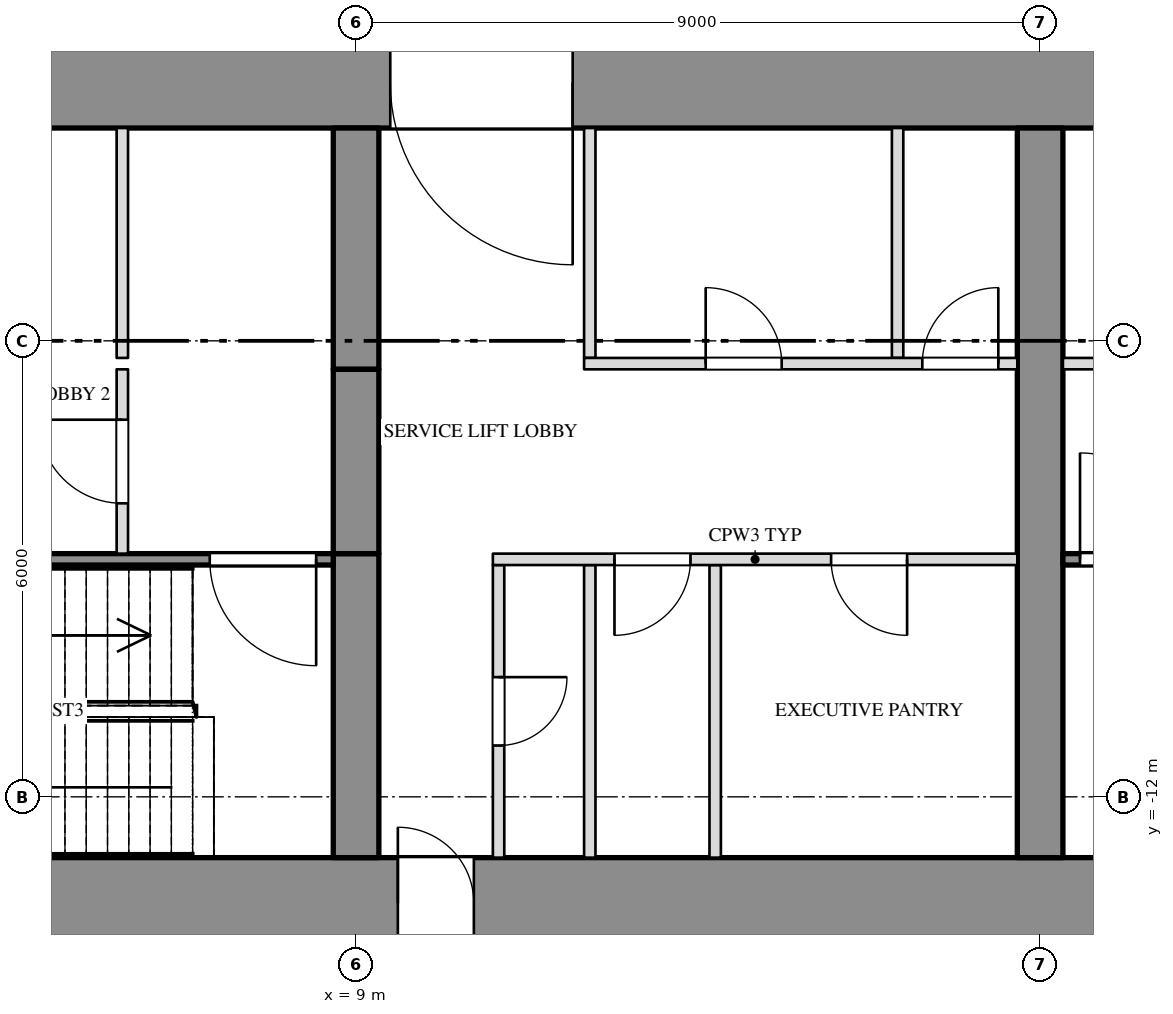
"""IFC4 building model, lengths in metres.
Left out: names, types, materials, properties, quantities, classifications, styles, units other than length and angle.
Written with IfcOpenShell. Run it as: python <this file> out.ifc"""

import sys

from ifc_helpers import new_model, si_unit, direction, frame, frame_2d, origin, place, context, subcontext, project, spatial, rectangle, extrude, element, fill, save


model = new_model("IFC4")
c1 = context("Model", 3, precision=1e-05, world=origin(), true_north=direction((0.0, 1.0)))
c2 = subcontext(c1, "Body", "Model", "MODEL_VIEW")
j1 = project(units=[si_unit("LENGTHUNIT", "METRE"), si_unit("PLANEANGLEUNIT", "RADIAN")], contexts=[c1])
p1 = place(None, origin())
s1 = spatial("IfcSite", under=j1, at=p1, CompositionType="ELEMENT")
p2 = place(p1, origin())
s2 = spatial("IfcBuilding", under=s1, at=p2, CompositionType="ELEMENT")
p3 = place(p2, frame((0.0, 0.0, 43.5)))
s3 = spatial("IfcBuildingStorey", under=s2, at=p3, CompositionType="ELEMENT", Elevation=43.5)
p4 = place(p3, frame((-27.0, -2.6, 0.0), z_axis=(0.0, 0.0, 1.0), x_axis=(1.0, 0.0, 0.0)))
e1 = element("IfcWall", 1, at=p4, inside=s3, PredefinedType="SHEAR", context=c2, shape_type="SweptSolid", body=[
    extrude(rectangle(XDim=54.0, YDim=1.2, at=frame_2d((27.0, 0.0))), origin(), (0.0, 0.0, 1.0), 4.25),
])
p5 = place(p4, frame((15.15, 0.0, 0.0)))
e2 = element("IfcOpeningElement", 2, at=p5, cuts=e1, PredefinedType="OPENING", context=c2, shape_type="SweptSolid", body=[
    extrude(rectangle(XDim=2.4, YDim=2.1, at=frame_2d((1.2, 1.05))), frame((0.0, 0.612, 0.0), z_axis=(0.0, -1.0, 0.0), x_axis=(1.0, 0.0, 0.0)), (0.0, 0.0, 1.0), 1.224),
])
p6 = place(p4, frame((36.45, 0.0, 0.0)))
e3 = element("IfcOpeningElement", 3, at=p6, cuts=e1, PredefinedType="OPENING", context=c2, shape_type="SweptSolid", body=[
    extrude(rectangle(XDim=2.4, YDim=2.1, at=frame_2d((1.2, 1.05))), frame((0.0, 0.612, 0.0), z_axis=(0.0, -1.0, 0.0), x_axis=(1.0, 0.0, 0.0)), (0.0, 0.0, 1.0), 1.224),
])
p7 = place(p3, frame((-27.0, -13.4, 0.0), z_axis=(0.0, 0.0, 1.0), x_axis=(1.0, 0.0, 0.0)))
e4 = element("IfcWall", 4, at=p7, inside=s3, PredefinedType="SHEAR", context=c2, shape_type="SweptSolid", body=[
    extrude(rectangle(XDim=54.0, YDim=1.2, at=frame_2d((27.0, 0.0))), origin(), (0.0, 0.0, 1.0), 4.25),
])
p8 = place(p7, frame((16.45, 0.0, 0.0)))
e5 = element("IfcOpeningElement", 5, at=p8, cuts=e4, PredefinedType="OPENING", context=c2, shape_type="SweptSolid", body=[
    extrude(rectangle(XDim=1.0, YDim=2.1, at=frame_2d((0.5, 1.05))), frame((0.0, 0.612, 0.0), z_axis=(0.0, -1.0, 0.0), x_axis=(1.0, 0.0, 0.0)), (0.0, 0.0, 1.0), 1.224),
])
p9 = place(p7, frame((36.55, 0.0, 0.0)))
e6 = element("IfcOpeningElement", 6, at=p9, cuts=e4, PredefinedType="OPENING", context=c2, shape_type="SweptSolid", body=[
    extrude(rectangle(XDim=1.0, YDim=2.1, at=frame_2d((0.5, 1.05))), frame((0.0, 0.612, 0.0), z_axis=(0.0, -1.0, 0.0), x_axis=(1.0, 0.0, 0.0)), (0.0, 0.0, 1.0), 1.224),
])
p10 = place(p3, frame((9.0, -12.8, 0.0), z_axis=(0.0, 0.0, 1.0), x_axis=(0.0, 1.0, 0.0)))
e7 = element("IfcWall", 7, at=p10, inside=s3, PredefinedType="SHEAR", context=c2, shape_type="SweptSolid", body=[
    extrude(rectangle(XDim=4.0, YDim=0.6, at=frame_2d((2.0, 0.0))), origin(), (0.0, 0.0, 1.0), 4.25),
])
p11 = place(p3, frame((9.0, -6.375, 0.0), z_axis=(0.0, 0.0, 1.0), x_axis=(0.0, 1.0, 0.0)))
e8 = element("IfcWall", 8, at=p11, inside=s3, PredefinedType="SHEAR", context=c2, shape_type="SweptSolid", body=[
    extrude(rectangle(XDim=3.175, YDim=0.6, at=frame_2d((1.587, 0.0))), origin(), (0.0, 0.0, 1.0), 4.25),
])
p12 = place(p3, frame((9.0, -8.8, 3.6), z_axis=(0.0, 0.0, 1.0), x_axis=(0.0, 1.0, 0.0)))
e9 = element("IfcWall", 9, at=p12, inside=s3, PredefinedType="SHEAR", context=c2, shape_type="SweptSolid", body=[
    extrude(rectangle(XDim=2.425, YDim=0.6, at=frame_2d((1.212, 0.0))), origin(), (0.0, 0.0, 1.0), 0.65),
])
p13 = place(p3, frame((18.0, -12.8, 0.0), z_axis=(0.0, 0.0, 1.0), x_axis=(0.0, 1.0, 0.0)))
e10 = element("IfcWall", 10, at=p13, inside=s3, PredefinedType="SHEAR", context=c2, shape_type="SweptSolid", body=[
    extrude(rectangle(XDim=9.6, YDim=0.6, at=frame_2d((4.8, 0.0))), origin(), (0.0, 0.0, 1.0), 4.25),
])
for number, where, z_axis, x_axis in (
    (11, (5.925, -6.225, 0.0), (0.0, 0.0, 1.0), (0.0, 1.0, 0.0)),
    (12, (12.075, -6.225, 0.0), (0.0, 0.0, 1.0), (0.0, 1.0, 0.0)),
    (13, (16.125, -6.225, 0.0), (0.0, 0.0, 1.0), (0.0, 1.0, 0.0)),
):
    element("IfcWall", number, at=place(p3, frame(where, z_axis=z_axis, x_axis=x_axis)), inside=s3, PredefinedType="PARTITIONING", context=c2, shape_type="SweptSolid", body=[
        extrude(rectangle(XDim=3.025, YDim=0.15, at=frame_2d((1.513, 0.0))), origin(), (0.0, 0.0, 1.0), 4.25),
    ])
p14 = place(p3, frame((10.875, -12.8, 0.0), z_axis=(0.0, 0.0, 1.0), x_axis=(0.0, 1.0, 0.0)))
e14 = element("IfcWall", 14, at=p14, inside=s3, PredefinedType="PARTITIONING", context=c2, shape_type="SweptSolid", body=[
    extrude(rectangle(XDim=3.85, YDim=0.15, at=frame_2d((1.925, 0.0))), origin(), (0.0, 0.0, 1.0), 4.25),
])
p15 = place(p14, frame((1.475, 0.0, 0.0)))
e15 = element("IfcOpeningElement", 15, at=p15, cuts=e14, PredefinedType="OPENING", context=c2, shape_type="SweptSolid", body=[
    extrude(rectangle(XDim=0.9, YDim=2.1, at=frame_2d((0.45, 1.05))), frame((0.0, 0.087, 0.0), z_axis=(0.0, -1.0, 0.0), x_axis=(1.0, 0.0, 0.0)), (0.0, 0.0, 1.0), 0.174),
])
for number, where, z_axis, x_axis in (
    (16, (12.075, -12.8, 0.0), (0.0, 0.0, 1.0), (0.0, 1.0, 0.0)),
    (17, (13.725, -12.8, 0.0), (0.0, 0.0, 1.0), (0.0, 1.0, 0.0)),
):
    element("IfcWall", number, at=place(p3, frame(where, z_axis=z_axis, x_axis=x_axis)), inside=s3, PredefinedType="PARTITIONING", context=c2, shape_type="SweptSolid", body=[
        extrude(rectangle(XDim=3.85, YDim=0.15, at=frame_2d((1.925, 0.0))), origin(), (0.0, 0.0, 1.0), 4.25),
    ])
p16 = place(p3, frame((5.925, -8.8, 0.0), z_axis=(0.0, 0.0, 1.0), x_axis=(0.0, 1.0, 0.0)))
e18 = element("IfcWall", 18, at=p16, inside=s3, PredefinedType="PARTITIONING", context=c2, shape_type="SweptSolid", body=[
    extrude(rectangle(XDim=2.425, YDim=0.15, at=frame_2d((1.212, 0.0))), origin(), (0.0, 0.0, 1.0), 4.25),
])
p17 = place(p16, frame((0.662, 0.0, 0.0)))
e19 = element("IfcOpeningElement", 19, at=p17, cuts=e18, PredefinedType="OPENING", context=c2, shape_type="SweptSolid", body=[
    extrude(rectangle(XDim=1.1, YDim=2.1, at=frame_2d((0.55, 1.05))), frame((0.0, 0.087, 0.0), z_axis=(0.0, -1.0, 0.0), x_axis=(1.0, 0.0, 0.0)), (0.0, 0.0, 1.0), 0.174),
])
p18 = place(p3, frame((12.0, -6.3, 0.0), z_axis=(0.0, 0.0, 1.0), x_axis=(1.0, 0.0, 0.0)))
e20 = element("IfcWall", 20, at=p18, inside=s3, PredefinedType="PARTITIONING", context=c2, shape_type="SweptSolid", body=[
    extrude(rectangle(XDim=5.7, YDim=0.15, at=frame_2d((2.85, 0.0))), origin(), (0.0, 0.0, 1.0), 4.25),
])
p19 = place(p18, frame((1.6, 0.0, 0.0)))
e21 = element("IfcOpeningElement", 21, at=p19, cuts=e20, PredefinedType="OPENING", context=c2, shape_type="SweptSolid", body=[
    extrude(rectangle(XDim=1.0, YDim=2.1, at=frame_2d((0.5, 1.05))), frame((0.0, 0.087, 0.0), z_axis=(0.0, -1.0, 0.0), x_axis=(1.0, 0.0, 0.0)), (0.0, 0.0, 1.0), 0.174),
])
p20 = place(p18, frame((4.45, 0.0, 0.0)))
e22 = element("IfcOpeningElement", 22, at=p20, cuts=e20, PredefinedType="OPENING", context=c2, shape_type="SweptSolid", body=[
    extrude(rectangle(XDim=1.0, YDim=2.1, at=frame_2d((0.5, 1.05))), frame((0.0, 0.087, 0.0), z_axis=(0.0, -1.0, 0.0), x_axis=(1.0, 0.0, 0.0)), (0.0, 0.0, 1.0), 0.174),
])
p21 = place(p3, frame((18.3, -6.3, 0.0), z_axis=(0.0, 0.0, 1.0), x_axis=(1.0, 0.0, 0.0)))
e23 = element("IfcWall", 23, at=p21, inside=s3, PredefinedType="PARTITIONING", context=c2, shape_type="SweptSolid", body=[
    extrude(rectangle(XDim=5.1, YDim=0.15, at=frame_2d((2.55, 0.0))), origin(), (0.0, 0.0, 1.0), 4.25),
])
p22 = place(p3, frame((0.3, -8.875, 0.0), z_axis=(0.0, 0.0, 1.0), x_axis=(1.0, 0.0, 0.0)))
e24 = element("IfcWall", 24, at=p22, inside=s3, PredefinedType="SHEAR", context=c2, shape_type="SweptSolid", body=[
    extrude(rectangle(XDim=8.4, YDim=0.15, at=frame_2d((4.2, 0.0))), origin(), (0.0, 0.0, 1.0), 4.25),
])
p23 = place(p22, frame((6.775, 0.0, 0.0)))
e25 = element("IfcOpeningElement", 25, at=p23, cuts=e24, PredefinedType="OPENING", context=c2, shape_type="SweptSolid", body=[
    extrude(rectangle(XDim=1.4, YDim=2.1, at=frame_2d((0.7, 1.05))), frame((0.0, 0.087, 0.0), z_axis=(0.0, -1.0, 0.0), x_axis=(1.0, 0.0, 0.0)), (0.0, 0.0, 1.0), 0.174),
])
p24 = place(p3, frame((10.8, -8.875, 0.0), z_axis=(0.0, 0.0, 1.0), x_axis=(1.0, 0.0, 0.0)))
e26 = element("IfcWall", 26, at=p24, inside=s3, PredefinedType="PARTITIONING", context=c2, shape_type="SweptSolid", body=[
    extrude(rectangle(XDim=6.9, YDim=0.15, at=frame_2d((3.45, 0.0))), origin(), (0.0, 0.0, 1.0), 4.25),
])
p25 = place(p24, frame((1.6, 0.0, 0.0)))
e27 = element("IfcOpeningElement", 27, at=p25, cuts=e26, PredefinedType="OPENING", context=c2, shape_type="SweptSolid", body=[
    extrude(rectangle(XDim=1.0, YDim=2.1, at=frame_2d((0.5, 1.05))), frame((0.0, 0.087, 0.0), z_axis=(0.0, -1.0, 0.0), x_axis=(1.0, 0.0, 0.0)), (0.0, 0.0, 1.0), 0.174),
])
p26 = place(p24, frame((4.45, 0.0, 0.0)))
e28 = element("IfcOpeningElement", 28, at=p26, cuts=e26, PredefinedType="OPENING", context=c2, shape_type="SweptSolid", body=[
    extrude(rectangle(XDim=1.0, YDim=2.1, at=frame_2d((0.5, 1.05))), frame((0.0, 0.087, 0.0), z_axis=(0.0, -1.0, 0.0), x_axis=(1.0, 0.0, 0.0)), (0.0, 0.0, 1.0), 0.174),
])
p27 = place(p3, frame((18.3, -8.875, 0.0), z_axis=(0.0, 0.0, 1.0), x_axis=(1.0, 0.0, 0.0)))
e29 = element("IfcWall", 29, at=p27, inside=s3, PredefinedType="SHEAR", context=c2, shape_type="SweptSolid", body=[
    extrude(rectangle(XDim=7.5, YDim=0.15, at=frame_2d((3.75, 0.0))), origin(), (0.0, 0.0, 1.0), 4.25),
])
p28 = place(p27, frame((0.225, 0.0, 0.0)))
e30 = element("IfcOpeningElement", 30, at=p28, cuts=e29, PredefinedType="OPENING", context=c2, shape_type="SweptSolid", body=[
    extrude(rectangle(XDim=1.4, YDim=2.1, at=frame_2d((0.7, 1.05))), frame((0.0, 0.087, 0.0), z_axis=(0.0, -1.0, 0.0), x_axis=(1.0, 0.0, 0.0)), (0.0, 0.0, 1.0), 0.174),
])
p29 = place(p17, origin())
e31 = element("IfcDoor", 31, at=p29, inside=s3, OperationType="SINGLE_SWING_RIGHT", PredefinedType="DOOR", context=c2, shape_type="SweptSolid", body=[
    extrude(rectangle(XDim=1.1, YDim=2.1, at=frame_2d((0.55, 1.05))), frame((0.0, 0.025, 0.0), z_axis=(0.0, -1.0, 0.0), x_axis=(1.0, 0.0, 0.0)), (0.0, 0.0, 1.0), 0.05),
])
fill(e19, e31)
p30 = place(p23, origin())
e32 = element("IfcDoor", 32, at=p30, inside=s3, OperationType="DOUBLE_DOOR_SINGLE_SWING", PredefinedType="DOOR", context=c2, shape_type="SweptSolid", body=[
    extrude(rectangle(XDim=1.4, YDim=2.1, at=frame_2d((0.7, 1.05))), frame((0.0, 0.025, 0.0), z_axis=(0.0, -1.0, 0.0), x_axis=(1.0, 0.0, 0.0)), (0.0, 0.0, 1.0), 0.05),
])
fill(e25, e32)
p31 = place(p9, origin())
e33 = element("IfcDoor", 33, at=p31, inside=s3, OperationType="SINGLE_SWING_LEFT", PredefinedType="DOOR", context=c2, shape_type="SweptSolid", body=[
    extrude(rectangle(XDim=1.0, YDim=2.1, at=frame_2d((0.5, 1.05))), frame((0.0, 0.025, 0.0), z_axis=(0.0, -1.0, 0.0), x_axis=(1.0, 0.0, 0.0)), (0.0, 0.0, 1.0), 0.05),
])
fill(e6, e33)
p32 = place(p6, origin())
e34 = element("IfcDoor", 34, at=p32, inside=s3, OperationType="DOUBLE_DOOR_SINGLE_SWING", PredefinedType="DOOR", context=c2, shape_type="SweptSolid", body=[
    extrude(rectangle(XDim=2.4, YDim=2.1, at=frame_2d((1.2, 1.05))), frame((0.0, 0.025, 0.0), z_axis=(0.0, -1.0, 0.0), x_axis=(1.0, 0.0, 0.0)), (0.0, 0.0, 1.0), 0.05),
])
fill(e3, e34)
p33 = place(p15, origin())
e35 = element("IfcDoor", 35, at=p33, inside=s3, OperationType="SINGLE_SWING_LEFT", PredefinedType="DOOR", context=c2, shape_type="SweptSolid", body=[
    extrude(rectangle(XDim=0.9, YDim=2.1, at=frame_2d((0.45, 1.05))), frame((0.0, 0.025, 0.0), z_axis=(0.0, -1.0, 0.0), x_axis=(1.0, 0.0, 0.0)), (0.0, 0.0, 1.0), 0.05),
])
fill(e15, e35)
p34 = place(p25, origin())
e36 = element("IfcDoor", 36, at=p34, inside=s3, OperationType="SINGLE_SWING_RIGHT", PredefinedType="DOOR", context=c2, shape_type="SweptSolid", body=[
    extrude(rectangle(XDim=1.0, YDim=2.1, at=frame_2d((0.5, 1.05))), frame((0.0, 0.025, 0.0), z_axis=(0.0, -1.0, 0.0), x_axis=(1.0, 0.0, 0.0)), (0.0, 0.0, 1.0), 0.05),
])
fill(e27, e36)
p35 = place(p19, origin())
e37 = element("IfcDoor", 37, at=p35, inside=s3, OperationType="SINGLE_SWING_LEFT", PredefinedType="DOOR", context=c2, shape_type="SweptSolid", body=[
    extrude(rectangle(XDim=1.0, YDim=2.1, at=frame_2d((0.5, 1.05))), frame((0.0, 0.025, 0.0), z_axis=(0.0, -1.0, 0.0), x_axis=(1.0, 0.0, 0.0)), (0.0, 0.0, 1.0), 0.05),
])
fill(e21, e37)
p36 = place(p26, origin())
e38 = element("IfcDoor", 38, at=p36, inside=s3, OperationType="SINGLE_SWING_LEFT", PredefinedType="DOOR", context=c2, shape_type="SweptSolid", body=[
    extrude(rectangle(XDim=1.0, YDim=2.1, at=frame_2d((0.5, 1.05))), frame((0.0, 0.025, 0.0), z_axis=(0.0, -1.0, 0.0), x_axis=(1.0, 0.0, 0.0)), (0.0, 0.0, 1.0), 0.05),
])
fill(e28, e38)
p37 = place(p20, origin())
e39 = element("IfcDoor", 39, at=p37, inside=s3, OperationType="SINGLE_SWING_RIGHT", PredefinedType="DOOR", context=c2, shape_type="SweptSolid", body=[
    extrude(rectangle(XDim=1.0, YDim=2.1, at=frame_2d((0.5, 1.05))), frame((0.0, 0.025, 0.0), z_axis=(0.0, -1.0, 0.0), x_axis=(1.0, 0.0, 0.0)), (0.0, 0.0, 1.0), 0.05),
])
fill(e22, e39)
p38 = place(p28, origin())
e40 = element("IfcDoor", 40, at=p38, inside=s3, OperationType="DOUBLE_DOOR_SINGLE_SWING", PredefinedType="DOOR", context=c2, shape_type="SweptSolid", body=[
    extrude(rectangle(XDim=1.4, YDim=2.1, at=frame_2d((0.7, 1.05))), frame((0.0, 0.025, 0.0), z_axis=(0.0, -1.0, 0.0), x_axis=(1.0, 0.0, 0.0)), (0.0, 0.0, 1.0), 0.05),
])
fill(e30, e40)
save(model, sys.argv[1])
